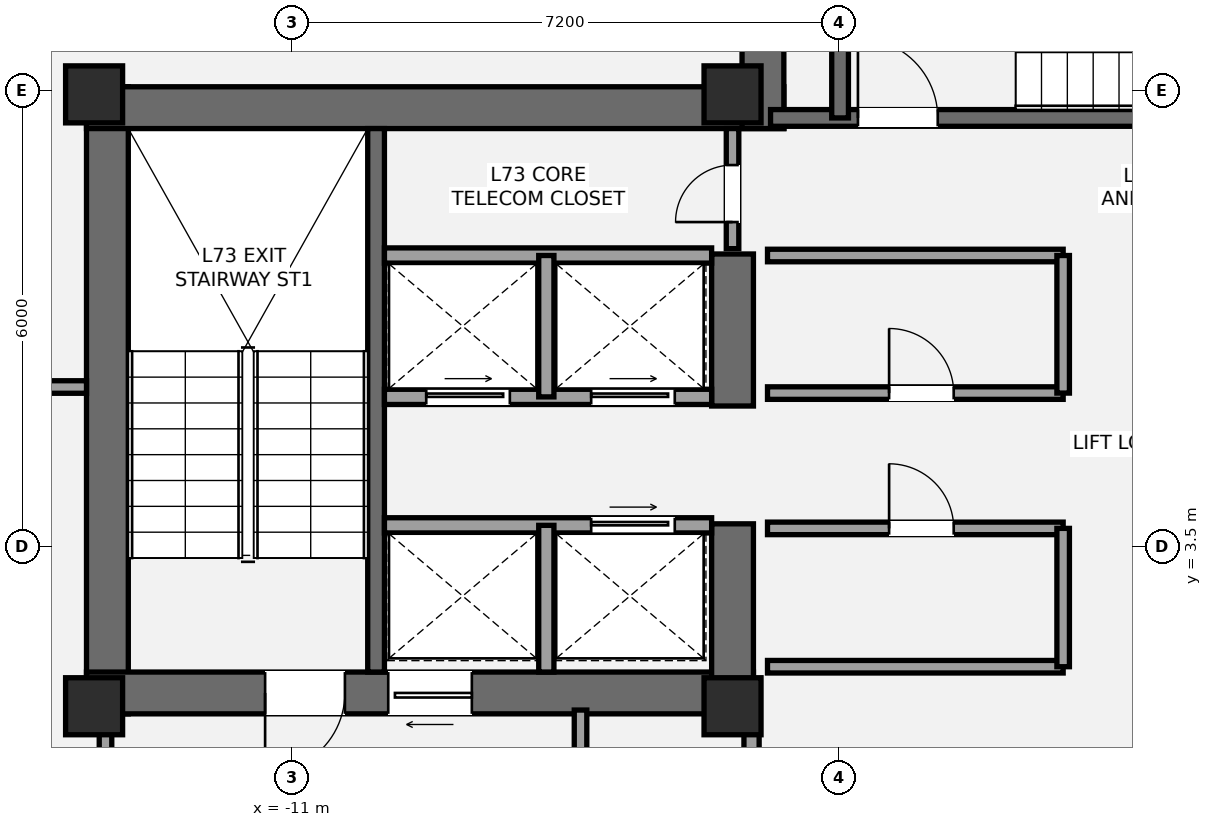
"""IFC4 building model, lengths in metres.
Left out: names, types, materials, properties, quantities, classifications, styles, units other than length and angle.
Written with IfcOpenShell. Run it as: python <this file> out.ifc"""

import sys

from ifc_helpers import new_model, si_unit, direction, frame, frame_2d, origin, origin_2d, place, context, subcontext, project, spatial, rectangle, extrude, element, fill, save


model = new_model("IFC4")
c1 = context("Model", 3, precision=1e-05, world=origin(), true_north=direction((0.0, 1.0)))
c2 = subcontext(c1, "Body", "Model", "MODEL_VIEW")
j1 = project(units=[si_unit("LENGTHUNIT", "METRE"), si_unit("PLANEANGLEUNIT", "RADIAN")], contexts=[c1])
p1 = place(None, origin())
s1 = spatial("IfcSite", under=j1, at=p1, CompositionType="ELEMENT")
p2 = place(p1, origin())
s2 = spatial("IfcBuilding", under=s1, at=p2, CompositionType="ELEMENT")
p3 = place(p2, frame((0.0, 0.0, 257.25)))
s3 = spatial("IfcBuildingStorey", under=s2, at=p3, CompositionType="ELEMENT", Elevation=257.25)
p4 = place(p3, frame((-13.425, 1.3, 0.0), z_axis=(0.0, 0.0, 1.0), x_axis=(0.0, 1.0, 0.0)))
e1 = element("IfcWall", 1, at=p4, inside=s3, PredefinedType="SHEAR", context=c2, shape_type="SweptSolid", body=[
    extrude(rectangle(XDim=8.25, YDim=0.55, at=frame_2d((4.125, 0.0))), origin(), (0.0, 0.0, 1.0), 3.15),
])
p5 = place(p3, frame((-13.7, 9.275, 0.0), z_axis=(0.0, 0.0, 1.0), x_axis=(1.0, 0.0, 0.0)))
e2 = element("IfcWall", 2, at=p5, inside=s3, PredefinedType="SHEAR", context=c2, shape_type="SweptSolid", body=[
    extrude(rectangle(XDim=9.175, YDim=0.55, at=frame_2d((4.587, 0.0))), origin(), (0.0, 0.0, 1.0), 3.15),
])
p6 = place(p3, frame((-4.925, 1.575, 0.0), z_axis=(0.0, 0.0, 1.0), x_axis=(-1.0, 0.0, 0.0)))
e3 = element("IfcWall", 3, at=p6, inside=s3, PredefinedType="SHEAR", context=c2, shape_type="SweptSolid", body=[
    extrude(rectangle(XDim=8.775, YDim=0.55, at=frame_2d((4.387, 0.0))), origin(), (0.0, 0.0, 1.0), 3.15),
])
p7 = place(p6, frame((5.375, 0.0, 0.0)))
e4 = element("IfcOpeningElement", 4, at=p7, cuts=e3, PredefinedType="OPENING", context=c2, shape_type="SweptSolid", body=[
    extrude(rectangle(XDim=1.05, YDim=2.15, at=frame_2d((0.525, 1.075))), frame((0.0, 0.285, 0.0), z_axis=(0.0, -1.0, 0.0), x_axis=(1.0, 0.0, 0.0)), (0.0, 0.0, 1.0), 0.57),
])
p8 = place(p6, frame((3.705, 0.0, 0.0)))
e5 = element("IfcOpeningElement", 5, at=p8, cuts=e3, PredefinedType="OPENING", context=c2, shape_type="SweptSolid", body=[
    extrude(rectangle(XDim=1.1, YDim=2.2, at=frame_2d((0.55, 1.1))), frame((0.0, 0.285, 0.0), z_axis=(0.0, -1.0, 0.0), x_axis=(1.0, 0.0, 0.0)), (0.0, 0.0, 1.0), 0.57),
])
p9 = place(p3, frame((-5.2, 1.3, 0.0), z_axis=(0.0, 0.0, 1.0), x_axis=(0.0, 1.0, 0.0)))
e6 = element("IfcWall", 6, at=p9, inside=s3, PredefinedType="SHEAR", context=c2, shape_type="SweptSolid", body=[
    extrude(rectangle(XDim=2.5, YDim=0.55, at=frame_2d((1.25, 0.0))), origin(), (0.0, 0.0, 1.0), 3.15),
])
p10 = place(p3, frame((-5.2, 5.35, 0.0), z_axis=(0.0, 0.0, 1.0), x_axis=(0.0, 1.0, 0.0)))
e7 = element("IfcWall", 7, at=p10, inside=s3, PredefinedType="SHEAR", context=c2, shape_type="SweptSolid", body=[
    extrude(rectangle(XDim=2.0, YDim=0.55, at=frame_2d((1.0, 0.0))), origin(), (0.0, 0.0, 1.0), 3.15),
])
p11 = place(p3, frame((-9.89, 1.85, 0.0), z_axis=(0.0, 0.0, 1.0), x_axis=(0.0, 1.0, 0.0)))
e8 = element("IfcWall", 8, at=p11, inside=s3, PredefinedType="SHEAR", context=c2, shape_type="SweptSolid", body=[
    extrude(rectangle(XDim=7.15, YDim=0.22, at=frame_2d((3.575, 0.0))), origin(), (0.0, 0.0, 1.0), 3.15),
])
p12 = place(p3, frame((-4.8, 9.0, 0.0), z_axis=(0.0, 0.0, 1.0), x_axis=(0.0, 1.0, 0.0)))
e9 = element("IfcWall", 9, at=p12, inside=s3, PredefinedType="SHEAR", context=c2, shape_type="SweptSolid", body=[
    extrude(rectangle(XDim=3.95, YDim=0.55, at=frame_2d((1.975, 0.0))), origin(), (0.0, 0.0, 1.0), 3.15),
])
p13 = place(p3, frame((-4.7, 9.14, 0.0), z_axis=(0.0, 0.0, 1.0), x_axis=(1.0, 0.0, 0.0)))
e10 = element("IfcWall", 10, at=p13, inside=s3, PredefinedType="SHEAR", context=c2, shape_type="SweptSolid", body=[
    extrude(rectangle(XDim=9.3, YDim=0.22, at=frame_2d((4.65, 0.0))), origin(), (0.0, 0.0, 1.0), 3.15),
])
p14 = place(p13, frame((1.15, 0.0, 0.0)))
e11 = element("IfcOpeningElement", 11, at=p14, cuts=e10, PredefinedType="OPENING", context=c2, shape_type="SweptSolid", body=[
    extrude(rectangle(XDim=1.05, YDim=2.15, at=frame_2d((0.525, 1.075))), frame((0.0, 0.12, 0.0), z_axis=(0.0, -1.0, 0.0), x_axis=(1.0, 0.0, 0.0)), (0.0, 0.0, 1.0), 0.24),
])
p15 = place(p3, frame((-3.785, 9.14, 0.0), z_axis=(0.0, 0.0, 1.0), x_axis=(0.0, 1.0, 0.0)))
e12 = element("IfcWall", 12, at=p15, inside=s3, PredefinedType="SHEAR", context=c2, shape_type="SweptSolid", body=[
    extrude(rectangle(XDim=3.26, YDim=0.22, at=frame_2d((1.63, 0.0))), origin(), (0.0, 0.0, 1.0), 3.15),
])
for number, where, z_axis, x_axis in (
    (13, (-13.6, 1.4, 0.0), (0.0, 0.0, 1.0), (1.0, 0.0, 0.0)),
    (14, (-13.6, 9.45, 0.0), (0.0, 0.0, 1.0), (1.0, 0.0, 0.0)),
    (15, (-5.2, 1.4, 0.0), (0.0, 0.0, 1.0), (1.0, 0.0, 0.0)),
    (16, (-5.2, 9.45, 0.0), (0.0, 0.0, 1.0), (1.0, 0.0, 0.0)),
):
    element("IfcColumn", number, at=place(p3, frame(where, z_axis=z_axis, x_axis=x_axis)), inside=s3, PredefinedType="PILASTER", context=c2, shape_type="SweptSolid", body=[
        extrude(rectangle(XDim=0.75, YDim=0.75, at=origin_2d()), origin(), (0.0, 0.0, 1.0), 3.15),
    ])
p16 = place(p3, frame((-17.352, 9.541, 0.0), z_axis=(0.0, 0.0, 1.0), x_axis=(0.827669406477, 0.561215959842, 0.0)))
e17 = element("IfcWall", 17, at=p16, inside=s3, PredefinedType="STANDARD", context=c2, shape_type="SweptSolid", body=[
    extrude(rectangle(XDim=3.786, YDim=0.44, at=frame_2d((1.893, 0.0))), origin(), (0.0, 0.0, 1.0), 2.296),
])
p17 = place(p16, frame((0.25, 0.0, 0.58)))
e18 = element("IfcOpeningElement", 18, at=p17, cuts=e17, PredefinedType="OPENING", context=c2, shape_type="SweptSolid", body=[
    extrude(rectangle(XDim=0.9, YDim=1.35, at=frame_2d((0.45, 0.675))), frame((0.0, 0.23, 0.0), z_axis=(0.0, -1.0, 0.0), x_axis=(1.0, 0.0, 0.0)), (0.0, 0.0, 1.0), 0.46),
])
p18 = place(p3, frame((-13.45, -2.15, 0.0), z_axis=(0.0, 0.0, 1.0), x_axis=(0.0, 1.0, 0.0)))
e19 = element("IfcWall", 19, at=p18, inside=s3, PredefinedType="PARTITIONING", context=c2, shape_type="SweptSolid", body=[
    extrude(rectangle(XDim=3.5, YDim=0.165, at=frame_2d((1.75, 0.0))), origin(), (0.0, 0.0, 1.0), 2.383),
])
p19 = place(p18, frame((0.67, 0.0, 0.0)))
e20 = element("IfcOpeningElement", 20, at=p19, cuts=e19, PredefinedType="OPENING", context=c2, shape_type="SweptSolid", body=[
    extrude(rectangle(XDim=1.05, YDim=2.15, at=frame_2d((0.525, 1.075))), frame((0.0, 0.093, 0.0), z_axis=(0.0, -1.0, 0.0), x_axis=(1.0, 0.0, 0.0)), (0.0, 0.0, 1.0), 0.185),
])
p20 = place(p3, frame((-7.2, -2.15, 0.0), z_axis=(0.0, 0.0, 1.0), x_axis=(0.0, 1.0, 0.0)))
e21 = element("IfcWall", 21, at=p20, inside=s3, PredefinedType="PARTITIONING", context=c2, shape_type="SweptSolid", body=[
    extrude(rectangle(XDim=3.5, YDim=0.165, at=frame_2d((1.75, 0.0))), origin(), (0.0, 0.0, 1.0), 2.383),
])
p21 = place(p3, frame((-4.95, -2.15, 0.0), z_axis=(0.0, 0.0, 1.0), x_axis=(0.0, 1.0, 0.0)))
e22 = element("IfcWall", 22, at=p21, inside=s3, PredefinedType="SOLIDWALL", context=c2, shape_type="SweptSolid", body=[
    extrude(rectangle(XDim=3.5, YDim=0.2, at=frame_2d((1.75, 0.0))), origin(), (0.0, 0.0, 1.0), 2.383),
])
p22 = place(p21, frame((0.95, 0.0, 0.0)))
e23 = element("IfcOpeningElement", 23, at=p22, cuts=e22, PredefinedType="OPENING", context=c2, shape_type="SweptSolid", body=[
    extrude(rectangle(XDim=0.75, YDim=2.1, at=frame_2d((0.375, 1.05))), frame((0.0, 0.11, 0.0), z_axis=(0.0, -1.0, 0.0), x_axis=(1.0, 0.0, 0.0)), (0.0, 0.0, 1.0), 0.22),
])
p23 = place(p3, frame((-9.78, 3.78, 0.0), z_axis=(0.0, 0.0, 1.0), x_axis=(1.0, 0.0, 0.0)))
e24 = element("IfcWall", 24, at=p23, inside=s3, PredefinedType="SOLIDWALL", context=c2, shape_type="SweptSolid", body=[
    extrude(rectangle(XDim=4.305, YDim=0.2, at=frame_2d((2.152, 0.0))), origin(), (0.0, 0.0, 1.0), 2.93),
])
p24 = place(p23, frame((2.72, 0.0, 0.0)))
e25 = element("IfcOpeningElement", 25, at=p24, cuts=e24, PredefinedType="OPENING", context=c2, shape_type="SweptSolid", body=[
    extrude(rectangle(XDim=1.1, YDim=2.2, at=frame_2d((0.55, 1.1))), frame((0.0, 0.11, 0.0), z_axis=(0.0, -1.0, 0.0), x_axis=(1.0, 0.0, 0.0)), (0.0, 0.0, 1.0), 0.22),
])
p25 = place(p3, frame((-7.65, 1.85, 0.0), z_axis=(0.0, 0.0, 1.0), x_axis=(0.0, 1.0, 0.0)))
e26 = element("IfcWall", 26, at=p25, inside=s3, PredefinedType="SOLIDWALL", context=c2, shape_type="SweptSolid", body=[
    extrude(rectangle(XDim=1.93, YDim=0.2, at=frame_2d((0.965, 0.0))), origin(), (0.0, 0.0, 1.0), 2.93),
])
p26 = place(p3, frame((-9.78, 5.47, 0.0), z_axis=(0.0, 0.0, 1.0), x_axis=(1.0, 0.0, 0.0)))
e27 = element("IfcWall", 27, at=p26, inside=s3, PredefinedType="SOLIDWALL", context=c2, shape_type="SweptSolid", body=[
    extrude(rectangle(XDim=4.305, YDim=0.2, at=frame_2d((2.152, 0.0))), origin(), (0.0, 0.0, 1.0), 2.93),
])
p27 = place(p26, frame((0.55, 0.0, 0.0)))
e28 = element("IfcOpeningElement", 28, at=p27, cuts=e27, PredefinedType="OPENING", context=c2, shape_type="SweptSolid", body=[
    extrude(rectangle(XDim=1.1, YDim=2.2, at=frame_2d((0.55, 1.1))), frame((0.0, 0.11, 0.0), z_axis=(0.0, -1.0, 0.0), x_axis=(1.0, 0.0, 0.0)), (0.0, 0.0, 1.0), 0.22),
])
p28 = place(p26, frame((2.72, 0.0, 0.0)))
e29 = element("IfcOpeningElement", 29, at=p28, cuts=e27, PredefinedType="OPENING", context=c2, shape_type="SweptSolid", body=[
    extrude(rectangle(XDim=1.1, YDim=2.2, at=frame_2d((0.55, 1.1))), frame((0.0, 0.11, 0.0), z_axis=(0.0, -1.0, 0.0), x_axis=(1.0, 0.0, 0.0)), (0.0, 0.0, 1.0), 0.22),
])
p29 = place(p3, frame((-9.78, 7.33, 0.0), z_axis=(0.0, 0.0, 1.0), x_axis=(1.0, 0.0, 0.0)))
e30 = element("IfcWall", 30, at=p29, inside=s3, PredefinedType="SOLIDWALL", context=c2, shape_type="SweptSolid", body=[
    extrude(rectangle(XDim=4.305, YDim=0.2, at=frame_2d((2.152, 0.0))), origin(), (0.0, 0.0, 1.0), 2.93),
])
p30 = place(p3, frame((-7.65, 5.47, 0.0), z_axis=(0.0, 0.0, 1.0), x_axis=(0.0, 1.0, 0.0)))
e31 = element("IfcWall", 31, at=p30, inside=s3, PredefinedType="SOLIDWALL", context=c2, shape_type="SweptSolid", body=[
    extrude(rectangle(XDim=1.86, YDim=0.2, at=frame_2d((0.93, 0.0))), origin(), (0.0, 0.0, 1.0), 2.93),
])
p31 = place(p3, frame((-4.74, 1.92, 0.0), z_axis=(0.0, 0.0, 1.0), x_axis=(1.0, 0.0, 0.0)))
e32 = element("IfcWall", 32, at=p31, inside=s3, PredefinedType="PARTITIONING", context=c2, shape_type="SweptSolid", body=[
    extrude(rectangle(XDim=3.89, YDim=0.165, at=frame_2d((1.945, 0.0))), origin(), (0.0, 0.0, 1.0), 2.07),
])
p32 = place(p3, frame((-4.74, 3.74, 0.0), z_axis=(0.0, 0.0, 1.0), x_axis=(1.0, 0.0, 0.0)))
e33 = element("IfcWall", 33, at=p32, inside=s3, PredefinedType="PARTITIONING", context=c2, shape_type="SweptSolid", body=[
    extrude(rectangle(XDim=3.89, YDim=0.165, at=frame_2d((1.945, 0.0))), origin(), (0.0, 0.0, 1.0), 2.93),
])
p33 = place(p32, frame((1.6, 0.0, 0.0)))
e34 = element("IfcOpeningElement", 34, at=p33, cuts=e33, PredefinedType="OPENING", context=c2, shape_type="SweptSolid", body=[
    extrude(rectangle(XDim=0.85, YDim=2.1, at=frame_2d((0.425, 1.05))), frame((0.0, 0.093, 0.0), z_axis=(0.0, -1.0, 0.0), x_axis=(1.0, 0.0, 0.0)), (0.0, 0.0, 1.0), 0.185),
])
p34 = place(p3, frame((-0.85, 1.92, 0.0), z_axis=(0.0, 0.0, 1.0), x_axis=(0.0, 1.0, 0.0)))
e35 = element("IfcWall", 35, at=p34, inside=s3, PredefinedType="PARTITIONING", context=c2, shape_type="SweptSolid", body=[
    extrude(rectangle(XDim=1.82, YDim=0.165, at=frame_2d((0.91, 0.0))), origin(), (0.0, 0.0, 1.0), 2.93),
])
p35 = place(p3, frame((-4.74, 5.52, 0.0), z_axis=(0.0, 0.0, 1.0), x_axis=(1.0, 0.0, 0.0)))
e36 = element("IfcWall", 36, at=p35, inside=s3, PredefinedType="PARTITIONING", context=c2, shape_type="SweptSolid", body=[
    extrude(rectangle(XDim=3.89, YDim=0.165, at=frame_2d((1.945, 0.0))), origin(), (0.0, 0.0, 1.0), 2.93),
])
p36 = place(p35, frame((1.6, 0.0, 0.0)))
e37 = element("IfcOpeningElement", 37, at=p36, cuts=e36, PredefinedType="OPENING", context=c2, shape_type="SweptSolid", body=[
    extrude(rectangle(XDim=0.85, YDim=2.1, at=frame_2d((0.425, 1.05))), frame((0.0, 0.093, 0.0), z_axis=(0.0, -1.0, 0.0), x_axis=(1.0, 0.0, 0.0)), (0.0, 0.0, 1.0), 0.185),
])
p37 = place(p3, frame((-4.74, 7.33, 0.0), z_axis=(0.0, 0.0, 1.0), x_axis=(1.0, 0.0, 0.0)))
e38 = element("IfcWall", 38, at=p37, inside=s3, PredefinedType="PARTITIONING", context=c2, shape_type="SweptSolid", body=[
    extrude(rectangle(XDim=3.89, YDim=0.165, at=frame_2d((1.945, 0.0))), origin(), (0.0, 0.0, 1.0), 2.93),
])
p38 = place(p3, frame((-0.85, 5.52, 0.0), z_axis=(0.0, 0.0, 1.0), x_axis=(0.0, 1.0, 0.0)))
e39 = element("IfcWall", 39, at=p38, inside=s3, PredefinedType="PARTITIONING", context=c2, shape_type="SweptSolid", body=[
    extrude(rectangle(XDim=1.81, YDim=0.165, at=frame_2d((0.905, 0.0))), origin(), (0.0, 0.0, 1.0), 2.93),
])
p39 = place(p3, frame((-5.2, 7.42, 0.0), z_axis=(0.0, 0.0, 1.0), x_axis=(0.0, 1.0, 0.0)))
e40 = element("IfcWall", 40, at=p39, inside=s3, PredefinedType="PARTITIONING", context=c2, shape_type="SweptSolid", body=[
    extrude(rectangle(XDim=1.58, YDim=0.165, at=frame_2d((0.79, 0.0))), origin(), (0.0, 0.0, 1.0), 2.93),
])
p40 = place(p39, frame((0.35, 0.0, 0.0)))
e41 = element("IfcOpeningElement", 41, at=p40, cuts=e40, PredefinedType="OPENING", context=c2, shape_type="SweptSolid", body=[
    extrude(rectangle(XDim=0.75, YDim=2.1, at=frame_2d((0.375, 1.05))), frame((0.0, 0.093, 0.0), z_axis=(0.0, -1.0, 0.0), x_axis=(1.0, 0.0, 0.0)), (0.0, 0.0, 1.0), 0.185),
])
p41 = place(p3, frame((-19.572, 5.6, 0.0), z_axis=(0.0, 0.0, 1.0), x_axis=(1.0, 0.0, 0.0)))
e42 = element("IfcWall", 42, at=p41, inside=s3, PredefinedType="PARTITIONING", context=c2, shape_type="SweptSolid", body=[
    extrude(rectangle(XDim=5.872, YDim=0.165, at=frame_2d((2.936, 0.0))), origin(), (0.0, 0.0, 1.0), 2.383),
])
p42 = place(p41, frame((2.033, 0.0, 0.0)))
e43 = element("IfcOpeningElement", 43, at=p42, cuts=e42, PredefinedType="OPENING", context=c2, shape_type="SweptSolid", body=[
    extrude(rectangle(XDim=0.9, YDim=2.1, at=frame_2d((0.45, 1.05))), frame((0.0, 0.093, 0.0), z_axis=(0.0, -1.0, 0.0), x_axis=(1.0, 0.0, 0.0)), (0.0, 0.0, 1.0), 0.185),
])
p43 = place(p7, origin())
e44 = element("IfcDoor", 44, at=p43, inside=s3, OperationType="SINGLE_SWING_RIGHT", PredefinedType="DOOR", context=c2, shape_type="SweptSolid", body=[
    extrude(rectangle(XDim=1.05, YDim=2.15, at=frame_2d((0.525, 1.075))), frame((0.0, 0.025, 0.0), z_axis=(0.0, -1.0, 0.0), x_axis=(1.0, 0.0, 0.0)), (0.0, 0.0, 1.0), 0.05),
])
fill(e4, e44)
p44 = place(p14, origin())
e45 = element("IfcDoor", 45, at=p44, inside=s3, OperationType="SINGLE_SWING_LEFT", PredefinedType="DOOR", context=c2, shape_type="SweptSolid", body=[
    extrude(rectangle(XDim=1.05, YDim=2.15, at=frame_2d((0.525, 1.075))), frame((0.0, 0.025, 0.0), z_axis=(0.0, -1.0, 0.0), x_axis=(1.0, 0.0, 0.0)), (0.0, 0.0, 1.0), 0.05),
])
fill(e11, e45)
p45 = place(p8, origin())
e46 = element("IfcDoor", 46, at=p45, inside=s3, OperationType="SLIDING_TO_LEFT", PredefinedType="DOOR", context=c2, shape_type="SweptSolid", body=[
    extrude(rectangle(XDim=1.1, YDim=2.2, at=frame_2d((0.55, 1.1))), frame((0.0, 0.025, 0.0), z_axis=(0.0, -1.0, 0.0), x_axis=(1.0, 0.0, 0.0)), (0.0, 0.0, 1.0), 0.05),
])
fill(e5, e46)
p46 = place(p27, origin())
e47 = element("IfcDoor", 47, at=p46, inside=s3, OperationType="SLIDING_TO_LEFT", PredefinedType="DOOR", context=c2, shape_type="SweptSolid", body=[
    extrude(rectangle(XDim=1.1, YDim=2.2, at=frame_2d((0.55, 1.1))), frame((0.0, 0.025, 0.0), z_axis=(0.0, -1.0, 0.0), x_axis=(1.0, 0.0, 0.0)), (0.0, 0.0, 1.0), 0.05),
])
fill(e28, e47)
p47 = place(p28, origin())
e48 = element("IfcDoor", 48, at=p47, inside=s3, OperationType="SLIDING_TO_LEFT", PredefinedType="DOOR", context=c2, shape_type="SweptSolid", body=[
    extrude(rectangle(XDim=1.1, YDim=2.2, at=frame_2d((0.55, 1.1))), frame((0.0, 0.025, 0.0), z_axis=(0.0, -1.0, 0.0), x_axis=(1.0, 0.0, 0.0)), (0.0, 0.0, 1.0), 0.05),
])
fill(e29, e48)
p48 = place(p24, origin())
e49 = element("IfcDoor", 49, at=p48, inside=s3, OperationType="SLIDING_TO_LEFT", PredefinedType="DOOR", context=c2, shape_type="SweptSolid", body=[
    extrude(rectangle(XDim=1.1, YDim=2.2, at=frame_2d((0.55, 1.1))), frame((0.0, 0.025, 0.0), z_axis=(0.0, -1.0, 0.0), x_axis=(1.0, 0.0, 0.0)), (0.0, 0.0, 1.0), 0.05),
])
fill(e25, e49)
p49 = place(p33, origin())
e50 = element("IfcDoor", 50, at=p49, inside=s3, OperationType="SINGLE_SWING_LEFT", PredefinedType="DOOR", context=c2, shape_type="SweptSolid", body=[
    extrude(rectangle(XDim=0.85, YDim=2.1, at=frame_2d((0.425, 1.05))), frame((0.0, 0.025, 0.0), z_axis=(0.0, -1.0, 0.0), x_axis=(1.0, 0.0, 0.0)), (0.0, 0.0, 1.0), 0.05),
])
fill(e34, e50)
p50 = place(p36, origin())
e51 = element("IfcDoor", 51, at=p50, inside=s3, OperationType="SINGLE_SWING_LEFT", PredefinedType="DOOR", context=c2, shape_type="SweptSolid", body=[
    extrude(rectangle(XDim=0.85, YDim=2.1, at=frame_2d((0.425, 1.05))), frame((0.0, 0.025, 0.0), z_axis=(0.0, -1.0, 0.0), x_axis=(1.0, 0.0, 0.0)), (0.0, 0.0, 1.0), 0.05),
])
fill(e37, e51)
p51 = place(p40, origin())
e52 = element("IfcDoor", 52, at=p51, inside=s3, OperationType="SINGLE_SWING_LEFT", PredefinedType="DOOR", context=c2, shape_type="SweptSolid", body=[
    extrude(rectangle(XDim=0.75, YDim=2.1, at=frame_2d((0.375, 1.05))), frame((0.0, 0.025, 0.0), z_axis=(0.0, -1.0, 0.0), x_axis=(1.0, 0.0, 0.0)), (0.0, 0.0, 1.0), 0.05),
])
fill(e41, e52)
save(model, sys.argv[1])
